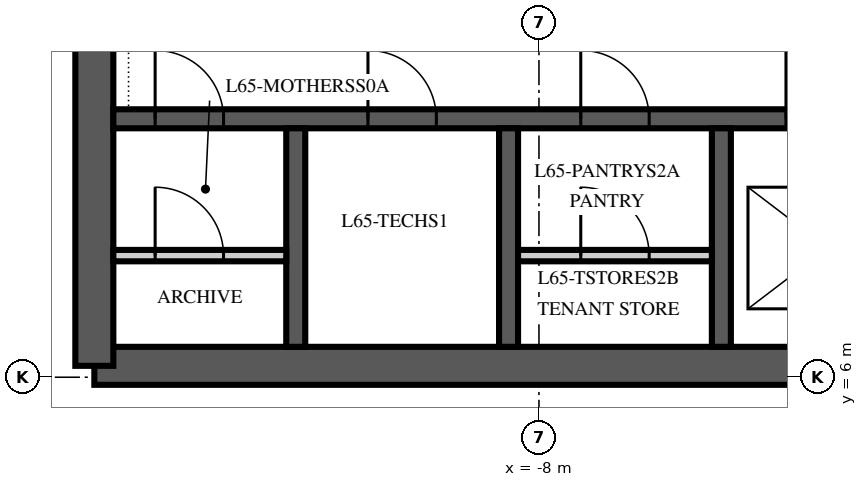
"""IFC4 building model, lengths in metres.
Left out: names, types, materials, properties, quantities, classifications, styles, units other than length and angle.
Written with IfcOpenShell. Run it as: python <this file> out.ifc"""

import sys

from ifc_helpers import new_model, si_unit, direction, frame, frame_2d, origin, place, context, subcontext, project, spatial, polyline, rectangle, outline, extrude, element, fill, save


model = new_model("IFC4")
c1 = context("Model", 3, precision=1e-05, world=origin(), true_north=direction((0.0, 1.0)))
c2 = subcontext(c1, "Body", "Model", "MODEL_VIEW")
j1 = project(units=[si_unit("LENGTHUNIT", "METRE"), si_unit("PLANEANGLEUNIT", "RADIAN")], contexts=[c1])
p1 = place(None, origin())
s1 = spatial("IfcSite", under=j1, at=p1, CompositionType="ELEMENT")
p2 = place(p1, origin())
s2 = spatial("IfcBuilding", under=s1, at=p2, CompositionType="ELEMENT")
p3 = place(p2, frame((0.0, 0.0, 280.0)))
s3 = spatial("IfcBuildingStorey", under=s2, at=p3, CompositionType="ELEMENT", Elevation=280.0)
p4 = place(p3, frame((-13.85, 6.15, 0.0), z_axis=(0.0, 0.0, 1.0), x_axis=(1.0, 0.0, 0.0)))
e1 = element("IfcWall", 1, at=p4, inside=s3, PredefinedType="SHEAR", context=c2, shape_type="SweptSolid", body=[
    extrude(rectangle(XDim=27.7, YDim=0.5, at=frame_2d((13.85, 0.0))), origin(), (0.0, 0.0, 1.0), 4.0),
])
p5 = place(p3, frame((-13.85, 23.85, 0.0), z_axis=(0.0, 0.0, 1.0), x_axis=(0.0, -1.0, 0.0)))
e2 = element("IfcWall", 2, at=p5, inside=s3, PredefinedType="SHEAR", context=c2, shape_type="SweptSolid", body=[
    extrude(outline(polyline([(0.0, -0.25), (17.7, -0.25), (17.7, 0.0), (17.45, 0.0), (17.45, 0.25), (0.25, 0.25), (0.25, 0.0), (0.0, 0.0), (0.0, -0.25)])), origin(), (0.0, 0.0, 1.0), 4.0),
])
p6 = place(p5, frame((11.75, 0.0, 0.0)))
e3 = element("IfcOpeningElement", 3, at=p6, cuts=e2, PredefinedType="OPENING", context=c2, shape_type="SweptSolid", body=[
    extrude(rectangle(XDim=1.8, YDim=2.4, at=frame_2d((0.9, 1.2))), frame((0.0, 0.265, 0.0), z_axis=(0.0, -1.0, 0.0), x_axis=(1.0, 0.0, 0.0)), (0.0, 0.0, 1.0), 0.53),
])
p7 = place(p3, frame((-13.6, 9.4, 0.0), z_axis=(0.0, 0.0, 1.0), x_axis=(1.0, 0.0, 0.0)))
e4 = element("IfcWall", 4, at=p7, inside=s3, PredefinedType="SHEAR", context=c2, shape_type="SweptSolid", body=[
    extrude(rectangle(XDim=27.2, YDim=0.25, at=frame_2d((13.6, 0.0))), origin(), (0.0, 0.0, 1.0), 4.0),
])
p8 = place(p7, frame((8.85, 0.0, 0.0)))
e5 = element("IfcOpeningElement", 5, at=p8, cuts=e4, PredefinedType="OPENING", context=c2, shape_type="SweptSolid", body=[
    extrude(rectangle(XDim=1.1, YDim=2.1, at=frame_2d((0.55, 1.05))), frame((0.0, 0.14, 0.0), z_axis=(0.0, -1.0, 0.0), x_axis=(1.0, 0.0, 0.0)), (0.0, 0.0, 1.0), 0.28),
])
p9 = place(p7, frame((11.65, 0.0, 0.0)))
e6 = element("IfcOpeningElement", 6, at=p9, cuts=e4, PredefinedType="OPENING", context=c2, shape_type="SweptSolid", body=[
    extrude(rectangle(XDim=1.1, YDim=2.1, at=frame_2d((0.55, 1.05))), frame((0.0, 0.14, 0.0), z_axis=(0.0, -1.0, 0.0), x_axis=(1.0, 0.0, 0.0)), (0.0, 0.0, 1.0), 0.28),
])
p10 = place(p7, frame((14.45, 0.0, 0.0)))
e7 = element("IfcOpeningElement", 7, at=p10, cuts=e4, PredefinedType="OPENING", context=c2, shape_type="SweptSolid", body=[
    extrude(rectangle(XDim=1.1, YDim=2.1, at=frame_2d((0.55, 1.05))), frame((0.0, 0.14, 0.0), z_axis=(0.0, -1.0, 0.0), x_axis=(1.0, 0.0, 0.0)), (0.0, 0.0, 1.0), 0.28),
])
p11 = place(p7, frame((0.55, 0.0, 0.0)))
e8 = element("IfcOpeningElement", 8, at=p11, cuts=e4, PredefinedType="OPENING", context=c2, shape_type="SweptSolid", body=[
    extrude(rectangle(XDim=0.9, YDim=2.1, at=frame_2d((0.45, 1.05))), frame((0.0, 0.14, 0.0), z_axis=(0.0, -1.0, 0.0), x_axis=(1.0, 0.0, 0.0)), (0.0, 0.0, 1.0), 0.28),
])
p12 = place(p7, frame((3.35, 0.0, 0.0)))
e9 = element("IfcOpeningElement", 9, at=p12, cuts=e4, PredefinedType="OPENING", context=c2, shape_type="SweptSolid", body=[
    extrude(rectangle(XDim=0.9, YDim=2.1, at=frame_2d((0.45, 1.05))), frame((0.0, 0.14, 0.0), z_axis=(0.0, -1.0, 0.0), x_axis=(1.0, 0.0, 0.0)), (0.0, 0.0, 1.0), 0.28),
])
p13 = place(p7, frame((6.15, 0.0, 0.0)))
e10 = element("IfcOpeningElement", 10, at=p13, cuts=e4, PredefinedType="OPENING", context=c2, shape_type="SweptSolid", body=[
    extrude(rectangle(XDim=0.9, YDim=2.1, at=frame_2d((0.45, 1.05))), frame((0.0, 0.14, 0.0), z_axis=(0.0, -1.0, 0.0), x_axis=(1.0, 0.0, 0.0)), (0.0, 0.0, 1.0), 0.28),
])
p14 = place(p7, frame((17.35, 0.0, 0.0)))
e11 = element("IfcOpeningElement", 11, at=p14, cuts=e4, PredefinedType="OPENING", context=c2, shape_type="SweptSolid", body=[
    extrude(rectangle(XDim=0.9, YDim=2.1, at=frame_2d((0.45, 1.05))), frame((0.0, 0.14, 0.0), z_axis=(0.0, -1.0, 0.0), x_axis=(1.0, 0.0, 0.0)), (0.0, 0.0, 1.0), 0.28),
])
p15 = place(p7, frame((20.15, 0.0, 0.0)))
e12 = element("IfcOpeningElement", 12, at=p15, cuts=e4, PredefinedType="OPENING", context=c2, shape_type="SweptSolid", body=[
    extrude(rectangle(XDim=0.9, YDim=2.1, at=frame_2d((0.45, 1.05))), frame((0.0, 0.14, 0.0), z_axis=(0.0, -1.0, 0.0), x_axis=(1.0, 0.0, 0.0)), (0.0, 0.0, 1.0), 0.28),
])
p16 = place(p7, frame((22.95, 0.0, 0.0)))
e13 = element("IfcOpeningElement", 13, at=p16, cuts=e4, PredefinedType="OPENING", context=c2, shape_type="SweptSolid", body=[
    extrude(rectangle(XDim=0.9, YDim=2.1, at=frame_2d((0.45, 1.05))), frame((0.0, 0.14, 0.0), z_axis=(0.0, -1.0, 0.0), x_axis=(1.0, 0.0, 0.0)), (0.0, 0.0, 1.0), 0.28),
])
for number, where, z_axis, x_axis in (
    (14, (-11.2, 6.4, 0.0), (0.0, 0.0, 1.0), (0.0, 1.0, 0.0)),
    (15, (-8.4, 6.4, 0.0), (0.0, 0.0, 1.0), (0.0, 1.0, 0.0)),
    (16, (-5.6, 6.4, 0.0), (0.0, 0.0, 1.0), (0.0, 1.0, 0.0)),
):
    element("IfcWall", number, at=place(p3, frame(where, z_axis=z_axis, x_axis=x_axis)), inside=s3, PredefinedType="SHEAR", context=c2, shape_type="SweptSolid", body=[
        extrude(rectangle(XDim=2.875, YDim=0.25, at=frame_2d((1.438, 0.0))), origin(), (0.0, 0.0, 1.0), 4.0),
    ])
p17 = place(p3, frame((-13.6, 7.6, 0.0), z_axis=(0.0, 0.0, 1.0), x_axis=(1.0, 0.0, 0.0)))
e17 = element("IfcWall", 17, at=p17, inside=s3, PredefinedType="PARTITIONING", context=c2, shape_type="SweptSolid", body=[
    extrude(rectangle(XDim=2.275, YDim=0.15, at=frame_2d((1.138, 0.0))), origin(), (0.0, 0.0, 1.0), 3.85),
])
p18 = place(p17, frame((0.55, 0.0, 0.0)))
e18 = element("IfcOpeningElement", 18, at=p18, cuts=e17, PredefinedType="OPENING", context=c2, shape_type="SweptSolid", body=[
    extrude(rectangle(XDim=0.9, YDim=2.1, at=frame_2d((0.45, 1.05))), frame((0.0, 0.09, 0.0), z_axis=(0.0, -1.0, 0.0), x_axis=(1.0, 0.0, 0.0)), (0.0, 0.0, 1.0), 0.18),
])
p19 = place(p3, frame((-8.275, 7.6, 0.0), z_axis=(0.0, 0.0, 1.0), x_axis=(1.0, 0.0, 0.0)))
e19 = element("IfcWall", 19, at=p19, inside=s3, PredefinedType="PARTITIONING", context=c2, shape_type="SweptSolid", body=[
    extrude(rectangle(XDim=2.55, YDim=0.15, at=frame_2d((1.275, 0.0))), origin(), (0.0, 0.0, 1.0), 3.85),
])
p20 = place(p19, frame((0.825, 0.0, 0.0)))
e20 = element("IfcOpeningElement", 20, at=p20, cuts=e19, PredefinedType="OPENING", context=c2, shape_type="SweptSolid", body=[
    extrude(rectangle(XDim=0.9, YDim=2.1, at=frame_2d((0.45, 1.05))), frame((0.0, 0.09, 0.0), z_axis=(0.0, -1.0, 0.0), x_axis=(1.0, 0.0, 0.0)), (0.0, 0.0, 1.0), 0.18),
])
p21 = place(p8, origin())
e21 = element("IfcDoor", 21, at=p21, inside=s3, OperationType="SLIDING_TO_LEFT", PredefinedType="DOOR", context=c2, shape_type="SweptSolid", body=[
    extrude(rectangle(XDim=1.1, YDim=2.1, at=frame_2d((0.55, 1.05))), frame((0.0, 0.125, 0.0), z_axis=(0.0, -1.0, 0.0), x_axis=(1.0, 0.0, 0.0)), (0.0, 0.0, 1.0), 0.25),
])
fill(e5, e21)
p22 = place(p11, origin())
e22 = element("IfcDoor", 22, at=p22, inside=s3, OperationType="SINGLE_SWING_LEFT", PredefinedType="DOOR", context=c2, shape_type="SweptSolid", body=[
    extrude(rectangle(XDim=0.9, YDim=2.1, at=frame_2d((0.45, 1.05))), frame((0.0, 0.125, 0.0), z_axis=(0.0, -1.0, 0.0), x_axis=(1.0, 0.0, 0.0)), (0.0, 0.0, 1.0), 0.25),
])
fill(e8, e22)
p23 = place(p18, origin())
e23 = element("IfcDoor", 23, at=p23, inside=s3, OperationType="SINGLE_SWING_LEFT", PredefinedType="DOOR", context=c2, shape_type="SweptSolid", body=[
    extrude(rectangle(XDim=0.9, YDim=2.1, at=frame_2d((0.45, 1.05))), frame((0.0, 0.075, 0.0), z_axis=(0.0, -1.0, 0.0), x_axis=(1.0, 0.0, 0.0)), (0.0, 0.0, 1.0), 0.149),
])
fill(e18, e23)
p24 = place(p12, origin())
e24 = element("IfcDoor", 24, at=p24, inside=s3, OperationType="SINGLE_SWING_LEFT", PredefinedType="DOOR", context=c2, shape_type="SweptSolid", body=[
    extrude(rectangle(XDim=0.9, YDim=2.1, at=frame_2d((0.45, 1.05))), frame((0.0, 0.125, 0.0), z_axis=(0.0, -1.0, 0.0), x_axis=(1.0, 0.0, 0.0)), (0.0, 0.0, 1.0), 0.25),
])
fill(e9, e24)
p25 = place(p13, origin())
e25 = element("IfcDoor", 25, at=p25, inside=s3, OperationType="SINGLE_SWING_LEFT", PredefinedType="DOOR", context=c2, shape_type="SweptSolid", body=[
    extrude(rectangle(XDim=0.9, YDim=2.1, at=frame_2d((0.45, 1.05))), frame((0.0, 0.125, 0.0), z_axis=(0.0, -1.0, 0.0), x_axis=(1.0, 0.0, 0.0)), (0.0, 0.0, 1.0), 0.25),
])
fill(e10, e25)
p26 = place(p20, origin())
e26 = element("IfcDoor", 26, at=p26, inside=s3, OperationType="SINGLE_SWING_LEFT", PredefinedType="DOOR", context=c2, shape_type="SweptSolid", body=[
    extrude(rectangle(XDim=0.9, YDim=2.1, at=frame_2d((0.45, 1.05))), frame((0.0, 0.075, 0.0), z_axis=(0.0, -1.0, 0.0), x_axis=(1.0, 0.0, 0.0)), (0.0, 0.0, 1.0), 0.149),
])
fill(e20, e26)
save(model, sys.argv[1])
